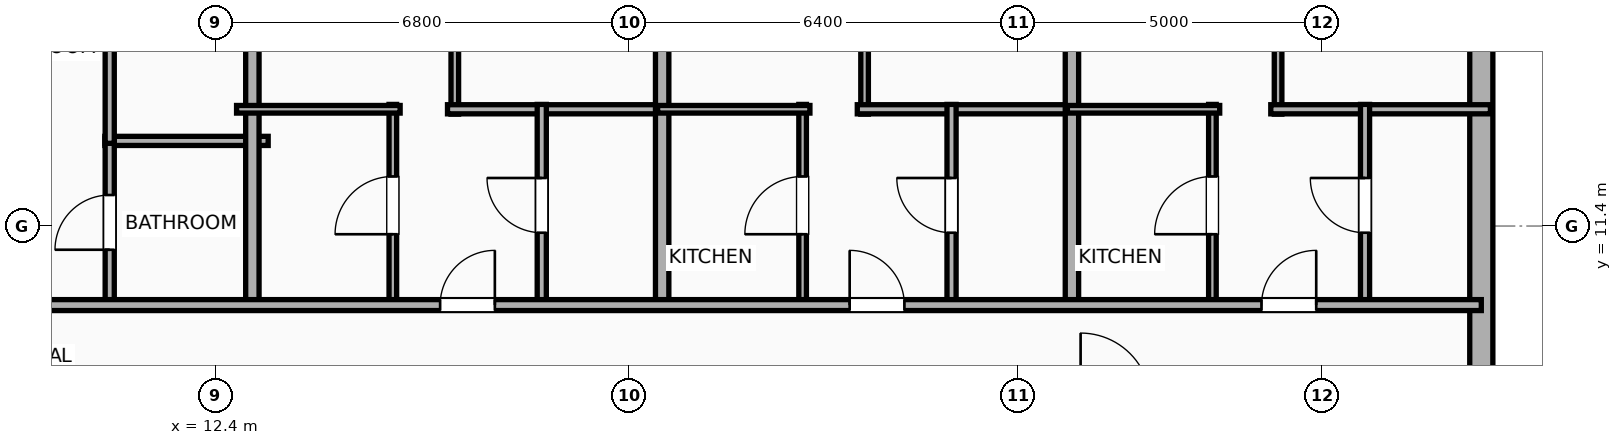
"""IFC4 building model, lengths in metres.
Left out: names, types, materials, properties, quantities, classifications, styles, units other than length and angle.
Written with IfcOpenShell. Run it as: python <this file> out.ifc"""

import sys

from ifc_helpers import new_model, si_unit, direction, frame, frame_2d, origin, place, context, subcontext, project, spatial, rectangle, extrude, element, fill, save


model = new_model("IFC4")
c1 = context("Model", 3, precision=1e-05, world=origin(), true_north=direction((0.0, 1.0)))
c2 = subcontext(c1, "Body", "Model", "MODEL_VIEW")
j1 = project(units=[si_unit("LENGTHUNIT", "METRE"), si_unit("PLANEANGLEUNIT", "RADIAN")], contexts=[c1])
p1 = place(None, origin())
s1 = spatial("IfcSite", under=j1, at=p1, CompositionType="ELEMENT")
p2 = place(p1, origin())
s2 = spatial("IfcBuilding", under=s1, at=p2, CompositionType="ELEMENT")
p3 = place(p2, frame((0.0, 0.0, 124.8)))
s3 = spatial("IfcBuildingStorey", under=s2, at=p3, CompositionType="ELEMENT", Elevation=124.8)
p4 = place(p3, frame((33.21, 17.781, 0.0), z_axis=(0.0, 0.0, 1.0), x_axis=(0.0, -1.0, 0.0)))
e1 = element("IfcWall", 1, at=p4, inside=s3, PredefinedType="ELEMENTEDWALL", context=c2, shape_type="SweptSolid", body=[
    extrude(rectangle(XDim=34.363, YDim=0.38, at=frame_2d((17.181, 0.0))), origin(), (0.0, 0.0, 1.0), 3.65),
])
p5 = place(p4, frame((12.836, 0.0, 0.75)))
e2 = element("IfcOpeningElement", 2, at=p5, cuts=e1, PredefinedType="OPENING", context=c2, shape_type="SweptSolid", body=[
    extrude(rectangle(XDim=1.2, YDim=2.05, at=frame_2d((0.6, 1.025))), frame((0.0, 0.2, 0.0), z_axis=(0.0, -1.0, 0.0), x_axis=(1.0, 0.0, 0.0)), (0.0, 0.0, 1.0), 0.4),
])
p6 = place(p4, frame((21.386, 0.0, 0.75)))
e3 = element("IfcOpeningElement", 3, at=p6, cuts=e1, PredefinedType="OPENING", context=c2, shape_type="SweptSolid", body=[
    extrude(rectangle(XDim=1.2, YDim=2.05, at=frame_2d((0.6, 1.025))), frame((0.0, 0.2, 0.0), z_axis=(0.0, -1.0, 0.0), x_axis=(1.0, 0.0, 0.0)), (0.0, 0.0, 1.0), 0.4),
])
p7 = place(p3, frame((10.574, 12.8, 0.0), z_axis=(0.0, 0.0, 1.0), x_axis=(1.0, 0.0, 0.0)))
e4 = element("IfcWall", 4, at=p7, inside=s3, PredefinedType="PLUMBINGWALL", context=c2, shape_type="SweptSolid", body=[
    extrude(rectangle(XDim=2.686, YDim=0.15, at=frame_2d((1.343, 0.0))), origin(), (0.0, 0.0, 1.0), 3.65),
])
p8 = place(p3, frame((10.654, 10.08, 0.0), z_axis=(0.0, 0.0, 1.0), x_axis=(0.0, 1.0, 0.0)))
e5 = element("IfcWall", 5, at=p8, inside=s3, PredefinedType="PLUMBINGWALL", context=c2, shape_type="SweptSolid", body=[
    extrude(rectangle(XDim=2.76, YDim=0.15, at=frame_2d((1.38, 0.0))), origin(), (0.0, 0.0, 1.0), 3.65),
])
p9 = place(p8, frame((0.93, 0.0, 0.0)))
e6 = element("IfcOpeningElement", 6, at=p9, cuts=e5, PredefinedType="OPENING", context=c2, shape_type="SweptSolid", body=[
    extrude(rectangle(XDim=0.9, YDim=2.05, at=frame_2d((0.45, 1.025))), frame((0.0, 0.085, 0.0), z_axis=(0.0, -1.0, 0.0), x_axis=(1.0, 0.0, 0.0)), (0.0, 0.0, 1.0), 0.17),
])
p10 = place(p3, frame((10.654, 12.76, 0.0), z_axis=(0.0, 0.0, 1.0), x_axis=(0.0, 1.0, 0.0)))
e7 = element("IfcWall", 7, at=p10, inside=s3, PredefinedType="PLUMBINGWALL", context=c2, shape_type="SweptSolid", body=[
    extrude(rectangle(XDim=8.898, YDim=0.15, at=frame_2d((4.449, 0.0))), origin(), (0.0, 0.0, 1.0), 3.65),
])
p11 = place(p10, frame((3.999, 0.0, 0.0)))
e8 = element("IfcOpeningElement", 8, at=p11, cuts=e7, PredefinedType="OPENING", context=c2, shape_type="SweptSolid", body=[
    extrude(rectangle(XDim=0.9, YDim=2.05, at=frame_2d((0.45, 1.025))), frame((0.0, 0.085, 0.0), z_axis=(0.0, -1.0, 0.0), x_axis=(1.0, 0.0, 0.0)), (0.0, 0.0, 1.0), 0.17),
])
p12 = place(p3, frame((13.0, 10.02, 0.0), z_axis=(0.0, 0.0, 1.0), x_axis=(0.0, 1.0, 0.0)))
e9 = element("IfcWall", 9, at=p12, inside=s3, PredefinedType="PARTITIONING", context=c2, shape_type="SweptSolid", body=[
    extrude(rectangle(XDim=11.59, YDim=0.22, at=frame_2d((5.795, 0.0))), origin(), (0.0, 0.0, 1.0), 3.65),
])
p13 = place(p3, frame((16.329, 13.24, 0.0), z_axis=(0.0, 0.0, 1.0), x_axis=(0.0, 1.0, 0.0)))
e10 = element("IfcWall", 10, at=p13, inside=s3, PredefinedType="PARTITIONING", context=c2, shape_type="SweptSolid", body=[
    extrude(rectangle(XDim=8.52, YDim=0.125, at=frame_2d((4.26, 0.0))), origin(), (0.0, 0.0, 1.0), 3.65),
])
p14 = place(p13, frame((1.595, 0.0, 0.0)))
e11 = element("IfcOpeningElement", 11, at=p14, cuts=e10, PredefinedType="OPENING", context=c2, shape_type="SweptSolid", body=[
    extrude(rectangle(XDim=0.9, YDim=2.05, at=frame_2d((0.45, 1.025))), frame((0.0, 0.073, 0.0), z_axis=(0.0, -1.0, 0.0), x_axis=(1.0, 0.0, 0.0)), (0.0, 0.0, 1.0), 0.145),
])
p15 = place(p3, frame((16.209, 13.32, 0.0), z_axis=(0.0, 0.0, 1.0), x_axis=(1.0, 0.0, 0.0)))
e12 = element("IfcWall", 12, at=p15, inside=s3, PredefinedType="PLUMBINGWALL", context=c2, shape_type="SweptSolid", body=[
    extrude(rectangle(XDim=3.605, YDim=0.15, at=frame_2d((1.802, 0.0))), origin(), (0.0, 0.0, 1.0), 3.65),
])
p16 = place(p3, frame((15.31, 10.08, 0.0), z_axis=(0.0, 0.0, 1.0), x_axis=(0.0, 1.0, 0.0)))
e13 = element("IfcWall", 13, at=p16, inside=s3, PredefinedType="PARTITIONING", context=c2, shape_type="SweptSolid", body=[
    extrude(rectangle(XDim=3.32, YDim=0.125, at=frame_2d((1.66, 0.0))), origin(), (0.0, 0.0, 1.0), 3.65),
])
p17 = place(p16, frame((1.185, 0.0, 0.0)))
e14 = element("IfcOpeningElement", 14, at=p17, cuts=e13, PredefinedType="OPENING", context=c2, shape_type="SweptSolid", body=[
    extrude(rectangle(XDim=0.95, YDim=2.05, at=frame_2d((0.475, 1.025))), frame((0.0, 0.073, 0.0), z_axis=(0.0, -1.0, 0.0), x_axis=(1.0, 0.0, 0.0)), (0.0, 0.0, 1.0), 0.145),
])
p18 = place(p3, frame((12.74, 13.32, 0.0), z_axis=(0.0, 0.0, 1.0), x_axis=(1.0, 0.0, 0.0)))
e15 = element("IfcWall", 15, at=p18, inside=s3, PredefinedType="PARTITIONING", context=c2, shape_type="SweptSolid", body=[
    extrude(rectangle(XDim=2.69, YDim=0.125, at=frame_2d((1.345, 0.0))), origin(), (0.0, 0.0, 1.0), 3.65),
])
p19 = place(p3, frame((17.759, 10.08, 0.0), z_axis=(0.0, 0.0, 1.0), x_axis=(0.0, 1.0, 0.0)))
e16 = element("IfcWall", 16, at=p19, inside=s3, PredefinedType="PLUMBINGWALL", context=c2, shape_type="SweptSolid", body=[
    extrude(rectangle(XDim=3.32, YDim=0.15, at=frame_2d((1.66, 0.0))), origin(), (0.0, 0.0, 1.0), 3.65),
])
p20 = place(p19, frame((1.21, 0.0, 0.0)))
e17 = element("IfcOpeningElement", 17, at=p20, cuts=e16, PredefinedType="OPENING", context=c2, shape_type="SweptSolid", body=[
    extrude(rectangle(XDim=0.9, YDim=2.05, at=frame_2d((0.45, 1.025))), frame((0.0, 0.085, 0.0), z_axis=(0.0, -1.0, 0.0), x_axis=(1.0, 0.0, 0.0)), (0.0, 0.0, 1.0), 0.17),
])
p21 = place(p3, frame((19.739, 10.02, 0.0), z_axis=(0.0, 0.0, 1.0), x_axis=(0.0, 1.0, 0.0)))
e18 = element("IfcWall", 18, at=p21, inside=s3, PredefinedType="PARTITIONING", context=c2, shape_type="SweptSolid", body=[
    extrude(rectangle(XDim=11.59, YDim=0.22, at=frame_2d((5.795, 0.0))), origin(), (0.0, 0.0, 1.0), 3.65),
])
p22 = place(p3, frame((23.068, 13.24, 0.0), z_axis=(0.0, 0.0, 1.0), x_axis=(0.0, 1.0, 0.0)))
e19 = element("IfcWall", 19, at=p22, inside=s3, PredefinedType="PARTITIONING", context=c2, shape_type="SweptSolid", body=[
    extrude(rectangle(XDim=8.52, YDim=0.125, at=frame_2d((4.26, 0.0))), origin(), (0.0, 0.0, 1.0), 3.65),
])
p23 = place(p22, frame((1.595, 0.0, 0.0)))
e20 = element("IfcOpeningElement", 20, at=p23, cuts=e19, PredefinedType="OPENING", context=c2, shape_type="SweptSolid", body=[
    extrude(rectangle(XDim=0.9, YDim=2.05, at=frame_2d((0.45, 1.025))), frame((0.0, 0.073, 0.0), z_axis=(0.0, -1.0, 0.0), x_axis=(1.0, 0.0, 0.0)), (0.0, 0.0, 1.0), 0.145),
])
p24 = place(p3, frame((22.948, 13.32, 0.0), z_axis=(0.0, 0.0, 1.0), x_axis=(1.0, 0.0, 0.0)))
e21 = element("IfcWall", 21, at=p24, inside=s3, PredefinedType="PLUMBINGWALL", context=c2, shape_type="SweptSolid", body=[
    extrude(rectangle(XDim=3.605, YDim=0.15, at=frame_2d((1.802, 0.0))), origin(), (0.0, 0.0, 1.0), 3.65),
])
p25 = place(p3, frame((22.049, 10.08, 0.0), z_axis=(0.0, 0.0, 1.0), x_axis=(0.0, 1.0, 0.0)))
e22 = element("IfcWall", 22, at=p25, inside=s3, PredefinedType="PARTITIONING", context=c2, shape_type="SweptSolid", body=[
    extrude(rectangle(XDim=3.32, YDim=0.125, at=frame_2d((1.66, 0.0))), origin(), (0.0, 0.0, 1.0), 3.65),
])
p26 = place(p25, frame((1.185, 0.0, 0.0)))
e23 = element("IfcOpeningElement", 23, at=p26, cuts=e22, PredefinedType="OPENING", context=c2, shape_type="SweptSolid", body=[
    extrude(rectangle(XDim=0.95, YDim=2.05, at=frame_2d((0.475, 1.025))), frame((0.0, 0.073, 0.0), z_axis=(0.0, -1.0, 0.0), x_axis=(1.0, 0.0, 0.0)), (0.0, 0.0, 1.0), 0.145),
])
p27 = place(p3, frame((19.664, 13.32, 0.0), z_axis=(0.0, 0.0, 1.0), x_axis=(1.0, 0.0, 0.0)))
e24 = element("IfcWall", 24, at=p27, inside=s3, PredefinedType="PARTITIONING", context=c2, shape_type="SweptSolid", body=[
    extrude(rectangle(XDim=2.505, YDim=0.125, at=frame_2d((1.252, 0.0))), origin(), (0.0, 0.0, 1.0), 3.65),
])
p28 = place(p3, frame((24.498, 10.08, 0.0), z_axis=(0.0, 0.0, 1.0), x_axis=(0.0, 1.0, 0.0)))
e25 = element("IfcWall", 25, at=p28, inside=s3, PredefinedType="PLUMBINGWALL", context=c2, shape_type="SweptSolid", body=[
    extrude(rectangle(XDim=3.32, YDim=0.15, at=frame_2d((1.66, 0.0))), origin(), (0.0, 0.0, 1.0), 3.65),
])
p29 = place(p28, frame((1.21, 0.0, 0.0)))
e26 = element("IfcOpeningElement", 26, at=p29, cuts=e25, PredefinedType="OPENING", context=c2, shape_type="SweptSolid", body=[
    extrude(rectangle(XDim=0.9, YDim=2.05, at=frame_2d((0.45, 1.025))), frame((0.0, 0.085, 0.0), z_axis=(0.0, -1.0, 0.0), x_axis=(1.0, 0.0, 0.0)), (0.0, 0.0, 1.0), 0.17),
])
p30 = place(p3, frame((26.478, 10.02, 0.0), z_axis=(0.0, 0.0, 1.0), x_axis=(0.0, 1.0, 0.0)))
e27 = element("IfcWall", 27, at=p30, inside=s3, PredefinedType="PARTITIONING", context=c2, shape_type="SweptSolid", body=[
    extrude(rectangle(XDim=11.59, YDim=0.22, at=frame_2d((5.795, 0.0))), origin(), (0.0, 0.0, 1.0), 3.65),
])
p31 = place(p3, frame((29.868, 13.24, 0.0), z_axis=(0.0, 0.0, 1.0), x_axis=(0.0, 1.0, 0.0)))
e28 = element("IfcWall", 28, at=p31, inside=s3, PredefinedType="PARTITIONING", context=c2, shape_type="SweptSolid", body=[
    extrude(rectangle(XDim=8.426, YDim=0.125, at=frame_2d((4.213, 0.0))), origin(), (0.0, 0.0, 1.0), 3.65),
])
p32 = place(p31, frame((1.572, 0.0, 0.0)))
e29 = element("IfcOpeningElement", 29, at=p32, cuts=e28, PredefinedType="OPENING", context=c2, shape_type="SweptSolid", body=[
    extrude(rectangle(XDim=0.9, YDim=2.05, at=frame_2d((0.45, 1.025))), frame((0.0, 0.073, 0.0), z_axis=(0.0, -1.0, 0.0), x_axis=(1.0, 0.0, 0.0)), (0.0, 0.0, 1.0), 0.145),
])
p33 = place(p3, frame((29.748, 13.32, 0.0), z_axis=(0.0, 0.0, 1.0), x_axis=(1.0, 0.0, 0.0)))
e30 = element("IfcWall", 30, at=p33, inside=s3, PredefinedType="PLUMBINGWALL", context=c2, shape_type="SweptSolid", body=[
    extrude(rectangle(XDim=3.612, YDim=0.15, at=frame_2d((1.806, 0.0))), origin(), (0.0, 0.0, 1.0), 3.65),
])
p34 = place(p3, frame((28.788, 10.08, 0.0), z_axis=(0.0, 0.0, 1.0), x_axis=(0.0, 1.0, 0.0)))
e31 = element("IfcWall", 31, at=p34, inside=s3, PredefinedType="PARTITIONING", context=c2, shape_type="SweptSolid", body=[
    extrude(rectangle(XDim=3.32, YDim=0.125, at=frame_2d((1.66, 0.0))), origin(), (0.0, 0.0, 1.0), 3.65),
])
p35 = place(p34, frame((1.185, 0.0, 0.0)))
e32 = element("IfcOpeningElement", 32, at=p35, cuts=e31, PredefinedType="OPENING", context=c2, shape_type="SweptSolid", body=[
    extrude(rectangle(XDim=0.95, YDim=2.05, at=frame_2d((0.475, 1.025))), frame((0.0, 0.073, 0.0), z_axis=(0.0, -1.0, 0.0), x_axis=(1.0, 0.0, 0.0)), (0.0, 0.0, 1.0), 0.145),
])
p36 = place(p3, frame((26.403, 13.32, 0.0), z_axis=(0.0, 0.0, 1.0), x_axis=(1.0, 0.0, 0.0)))
e33 = element("IfcWall", 33, at=p36, inside=s3, PredefinedType="PARTITIONING", context=c2, shape_type="SweptSolid", body=[
    extrude(rectangle(XDim=2.505, YDim=0.125, at=frame_2d((1.252, 0.0))), origin(), (0.0, 0.0, 1.0), 3.65),
])
p37 = place(p3, frame((31.298, 10.08, 0.0), z_axis=(0.0, 0.0, 1.0), x_axis=(0.0, 1.0, 0.0)))
e34 = element("IfcWall", 34, at=p37, inside=s3, PredefinedType="PLUMBINGWALL", context=c2, shape_type="SweptSolid", body=[
    extrude(rectangle(XDim=3.32, YDim=0.15, at=frame_2d((1.66, 0.0))), origin(), (0.0, 0.0, 1.0), 3.65),
])
p38 = place(p37, frame((1.21, 0.0, 0.0)))
e35 = element("IfcOpeningElement", 35, at=p38, cuts=e34, PredefinedType="OPENING", context=c2, shape_type="SweptSolid", body=[
    extrude(rectangle(XDim=0.9, YDim=2.05, at=frame_2d((0.45, 1.025))), frame((0.0, 0.085, 0.0), z_axis=(0.0, -1.0, 0.0), x_axis=(1.0, 0.0, 0.0)), (0.0, 0.0, 1.0), 0.17),
])
p39 = place(p3, frame((-29.21, 10.1, 0.0), z_axis=(0.0, 0.0, 1.0), x_axis=(1.0, 0.0, 0.0)))
e36 = element("IfcWall", 36, at=p39, inside=s3, PredefinedType="PARTITIONING", context=c2, shape_type="SweptSolid", body=[
    extrude(rectangle(XDim=62.42, YDim=0.18, at=frame_2d((31.21, 0.0))), origin(), (0.0, 0.0, 1.0), 3.65),
])
p40 = place(p39, frame((2.54, 0.0, 0.0)))
e37 = element("IfcOpeningElement", 37, at=p40, cuts=e36, PredefinedType="OPENING", context=c2, shape_type="SweptSolid", body=[
    extrude(rectangle(XDim=0.9, YDim=2.05, at=frame_2d((0.45, 1.025))), frame((0.0, 0.1, 0.0), z_axis=(0.0, -1.0, 0.0), x_axis=(1.0, 0.0, 0.0)), (0.0, 0.0, 1.0), 0.2),
])
p41 = place(p39, frame((9.1, 0.0, 0.0)))
e38 = element("IfcOpeningElement", 38, at=p41, cuts=e36, PredefinedType="OPENING", context=c2, shape_type="SweptSolid", body=[
    extrude(rectangle(XDim=1.15, YDim=2.05, at=frame_2d((0.575, 1.025))), frame((0.0, 0.1, 0.0), z_axis=(0.0, -1.0, 0.0), x_axis=(1.0, 0.0, 0.0)), (0.0, 0.0, 1.0), 0.2),
])
p42 = place(p39, frame((14.063, 0.0, 0.0)))
e39 = element("IfcOpeningElement", 39, at=p42, cuts=e36, PredefinedType="OPENING", context=c2, shape_type="SweptSolid", body=[
    extrude(rectangle(XDim=0.9, YDim=2.05, at=frame_2d((0.45, 1.025))), frame((0.0, 0.1, 0.0), z_axis=(0.0, -1.0, 0.0), x_axis=(1.0, 0.0, 0.0)), (0.0, 0.0, 1.0), 0.2),
])
p43 = place(p39, frame((20.954, 0.0, 0.0)))
e40 = element("IfcOpeningElement", 40, at=p43, cuts=e36, PredefinedType="OPENING", context=c2, shape_type="SweptSolid", body=[
    extrude(rectangle(XDim=1.15, YDim=2.05, at=frame_2d((0.575, 1.025))), frame((0.0, 0.1, 0.0), z_axis=(0.0, -1.0, 0.0), x_axis=(1.0, 0.0, 0.0)), (0.0, 0.0, 1.0), 0.2),
])
p44 = place(p39, frame((26.26, 0.0, 0.0)))
e41 = element("IfcOpeningElement", 41, at=p44, cuts=e36, PredefinedType="OPENING", context=c2, shape_type="SweptSolid", body=[
    extrude(rectangle(XDim=0.9, YDim=2.05, at=frame_2d((0.45, 1.025))), frame((0.0, 0.1, 0.0), z_axis=(0.0, -1.0, 0.0), x_axis=(1.0, 0.0, 0.0)), (0.0, 0.0, 1.0), 0.2),
])
p45 = place(p39, frame((31.01, 0.0, 0.0)))
e42 = element("IfcOpeningElement", 42, at=p45, cuts=e36, PredefinedType="OPENING", context=c2, shape_type="SweptSolid", body=[
    extrude(rectangle(XDim=1.15, YDim=2.05, at=frame_2d((0.575, 1.025))), frame((0.0, 0.1, 0.0), z_axis=(0.0, -1.0, 0.0), x_axis=(1.0, 0.0, 0.0)), (0.0, 0.0, 1.0), 0.2),
])
p46 = place(p39, frame((37.37, 0.0, 0.0)))
e43 = element("IfcOpeningElement", 43, at=p46, cuts=e36, PredefinedType="OPENING", context=c2, shape_type="SweptSolid", body=[
    extrude(rectangle(XDim=1.15, YDim=2.05, at=frame_2d((0.575, 1.025))), frame((0.0, 0.1, 0.0), z_axis=(0.0, -1.0, 0.0), x_axis=(1.0, 0.0, 0.0)), (0.0, 0.0, 1.0), 0.2),
])
p47 = place(p39, frame((45.298, 0.0, 0.0)))
e44 = element("IfcOpeningElement", 44, at=p47, cuts=e36, PredefinedType="OPENING", context=c2, shape_type="SweptSolid", body=[
    extrude(rectangle(XDim=0.9, YDim=2.05, at=frame_2d((0.45, 1.025))), frame((0.0, 0.1, 0.0), z_axis=(0.0, -1.0, 0.0), x_axis=(1.0, 0.0, 0.0)), (0.0, 0.0, 1.0), 0.2),
])
p48 = place(p39, frame((52.033, 0.0, 0.0)))
e45 = element("IfcOpeningElement", 45, at=p48, cuts=e36, PredefinedType="OPENING", context=c2, shape_type="SweptSolid", body=[
    extrude(rectangle(XDim=0.9, YDim=2.05, at=frame_2d((0.45, 1.025))), frame((0.0, 0.1, 0.0), z_axis=(0.0, -1.0, 0.0), x_axis=(1.0, 0.0, 0.0)), (0.0, 0.0, 1.0), 0.2),
])
p49 = place(p39, frame((58.805, 0.0, 0.0)))
e46 = element("IfcOpeningElement", 46, at=p49, cuts=e36, PredefinedType="OPENING", context=c2, shape_type="SweptSolid", body=[
    extrude(rectangle(XDim=0.9, YDim=2.05, at=frame_2d((0.45, 1.025))), frame((0.0, 0.1, 0.0), z_axis=(0.0, -1.0, 0.0), x_axis=(1.0, 0.0, 0.0)), (0.0, 0.0, 1.0), 0.2),
])
p50 = place(p9, origin())
e47 = element("IfcDoor", 47, at=p50, inside=s3, OperationType="SINGLE_SWING_LEFT", PredefinedType="DOOR", context=c2, shape_type="SweptSolid", body=[
    extrude(rectangle(XDim=0.9, YDim=2.05, at=frame_2d((0.45, 1.025))), frame((0.0, 0.025, 0.0), z_axis=(0.0, -1.0, 0.0), x_axis=(1.0, 0.0, 0.0)), (0.0, 0.0, 1.0), 0.05),
])
fill(e6, e47)
p51 = place(p17, origin())
e48 = element("IfcDoor", 48, at=p51, inside=s3, OperationType="SINGLE_SWING_LEFT", PredefinedType="DOOR", context=c2, shape_type="SweptSolid", body=[
    extrude(rectangle(XDim=0.95, YDim=2.05, at=frame_2d((0.475, 1.025))), frame((0.0, 0.025, 0.0), z_axis=(0.0, -1.0, 0.0), x_axis=(1.0, 0.0, 0.0)), (0.0, 0.0, 1.0), 0.05),
])
fill(e14, e48)
p52 = place(p20, origin())
e49 = element("IfcDoor", 49, at=p52, inside=s3, OperationType="SINGLE_SWING_RIGHT", PredefinedType="DOOR", context=c2, shape_type="SweptSolid", body=[
    extrude(rectangle(XDim=0.9, YDim=2.05, at=frame_2d((0.45, 1.025))), frame((0.0, 0.025, 0.0), z_axis=(0.0, -1.0, 0.0), x_axis=(1.0, 0.0, 0.0)), (0.0, 0.0, 1.0), 0.05),
])
fill(e17, e49)
p53 = place(p26, origin())
e50 = element("IfcDoor", 50, at=p53, inside=s3, OperationType="SINGLE_SWING_LEFT", PredefinedType="DOOR", context=c2, shape_type="SweptSolid", body=[
    extrude(rectangle(XDim=0.95, YDim=2.05, at=frame_2d((0.475, 1.025))), frame((0.0, 0.025, 0.0), z_axis=(0.0, -1.0, 0.0), x_axis=(1.0, 0.0, 0.0)), (0.0, 0.0, 1.0), 0.05),
])
fill(e23, e50)
p54 = place(p29, origin())
e51 = element("IfcDoor", 51, at=p54, inside=s3, OperationType="SINGLE_SWING_RIGHT", PredefinedType="DOOR", context=c2, shape_type="SweptSolid", body=[
    extrude(rectangle(XDim=0.9, YDim=2.05, at=frame_2d((0.45, 1.025))), frame((0.0, 0.025, 0.0), z_axis=(0.0, -1.0, 0.0), x_axis=(1.0, 0.0, 0.0)), (0.0, 0.0, 1.0), 0.05),
])
fill(e26, e51)
p55 = place(p35, origin())
e52 = element("IfcDoor", 52, at=p55, inside=s3, OperationType="SINGLE_SWING_LEFT", PredefinedType="DOOR", context=c2, shape_type="SweptSolid", body=[
    extrude(rectangle(XDim=0.95, YDim=2.05, at=frame_2d((0.475, 1.025))), frame((0.0, 0.025, 0.0), z_axis=(0.0, -1.0, 0.0), x_axis=(1.0, 0.0, 0.0)), (0.0, 0.0, 1.0), 0.05),
])
fill(e32, e52)
p56 = place(p38, origin())
e53 = element("IfcDoor", 53, at=p56, inside=s3, OperationType="SINGLE_SWING_RIGHT", PredefinedType="DOOR", context=c2, shape_type="SweptSolid", body=[
    extrude(rectangle(XDim=0.9, YDim=2.05, at=frame_2d((0.45, 1.025))), frame((0.0, 0.025, 0.0), z_axis=(0.0, -1.0, 0.0), x_axis=(1.0, 0.0, 0.0)), (0.0, 0.0, 1.0), 0.05),
])
fill(e35, e53)
p57 = place(p47, origin())
e54 = element("IfcDoor", 54, at=p57, inside=s3, OperationType="SINGLE_SWING_RIGHT", PredefinedType="DOOR", context=c2, shape_type="SweptSolid", body=[
    extrude(rectangle(XDim=0.9, YDim=2.05, at=frame_2d((0.45, 1.025))), frame((0.0, 0.025, 0.0), z_axis=(0.0, -1.0, 0.0), x_axis=(1.0, 0.0, 0.0)), (0.0, 0.0, 1.0), 0.05),
])
fill(e44, e54)
p58 = place(p48, origin())
e55 = element("IfcDoor", 55, at=p58, inside=s3, OperationType="SINGLE_SWING_LEFT", PredefinedType="DOOR", context=c2, shape_type="SweptSolid", body=[
    extrude(rectangle(XDim=0.9, YDim=2.05, at=frame_2d((0.45, 1.025))), frame((0.0, 0.025, 0.0), z_axis=(0.0, -1.0, 0.0), x_axis=(1.0, 0.0, 0.0)), (0.0, 0.0, 1.0), 0.05),
])
fill(e45, e55)
p59 = place(p49, origin())
e56 = element("IfcDoor", 56, at=p59, inside=s3, OperationType="SINGLE_SWING_RIGHT", PredefinedType="DOOR", context=c2, shape_type="SweptSolid", body=[
    extrude(rectangle(XDim=0.9, YDim=2.05, at=frame_2d((0.45, 1.025))), frame((0.0, 0.025, 0.0), z_axis=(0.0, -1.0, 0.0), x_axis=(1.0, 0.0, 0.0)), (0.0, 0.0, 1.0), 0.05),
])
fill(e46, e56)
save(model, sys.argv[1])
